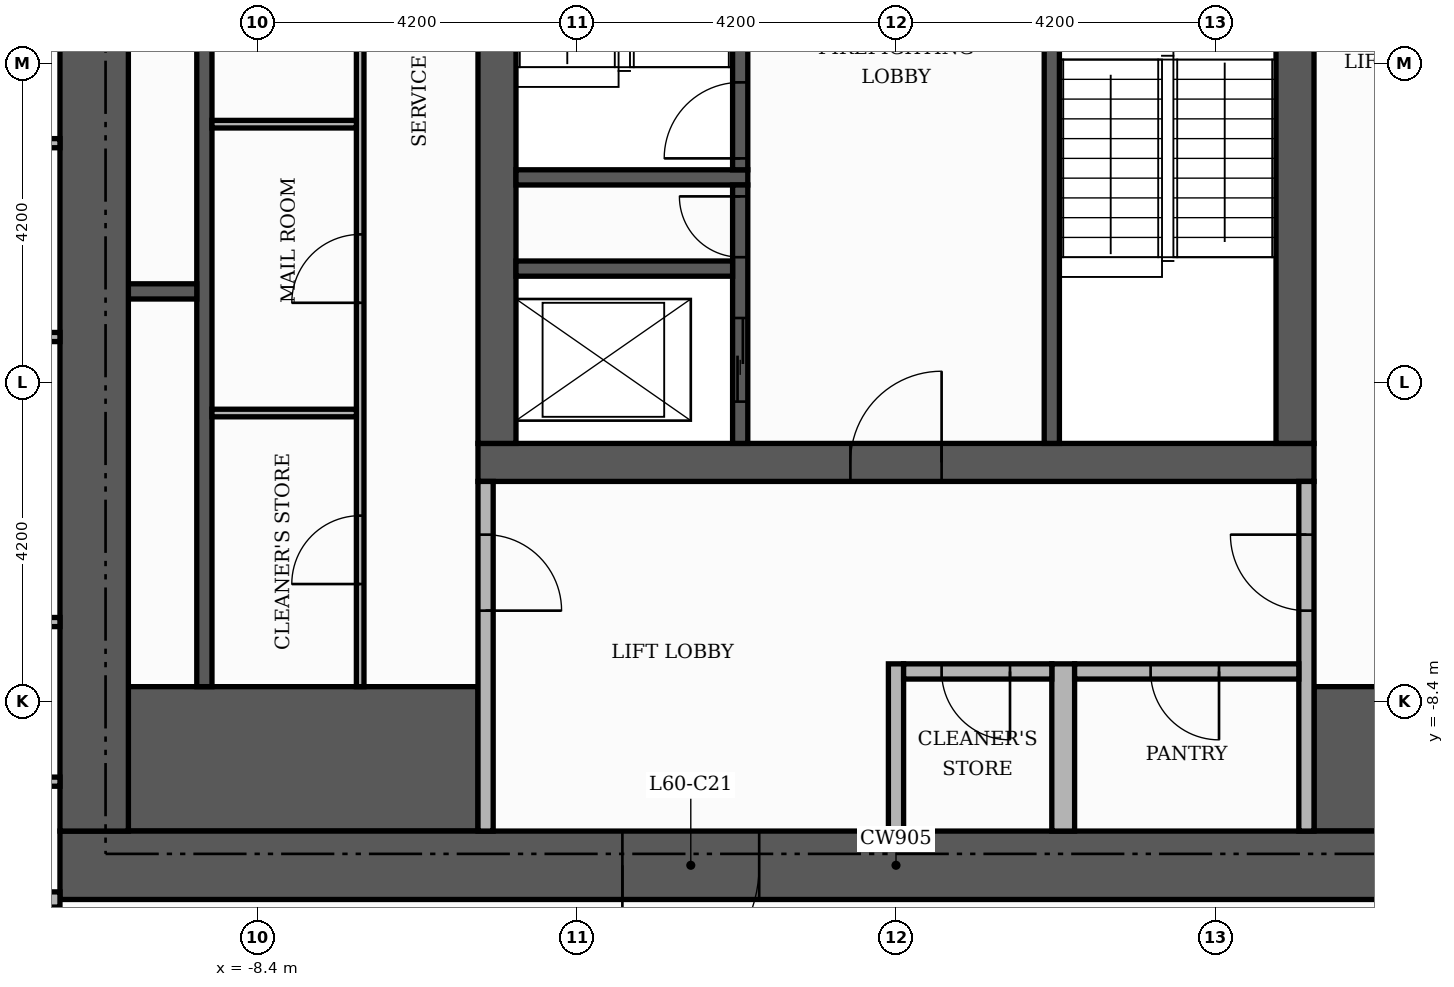
"""IFC4 building model, lengths in metres.
Left out: names, types, materials, properties, quantities, classifications, styles, units other than length and angle.
Written with IfcOpenShell. Run it as: python <this file> out.ifc"""

import sys

from ifc_helpers import new_model, si_unit, direction, frame, frame_2d, origin, place, context, subcontext, project, spatial, rectangle, extrude, element, fill, save


model = new_model("IFC4")
c1 = context("Model", 3, precision=1e-05, world=origin(), true_north=direction((0.0, 1.0)))
c2 = subcontext(c1, "Body", "Model", "MODEL_VIEW")
j1 = project(units=[si_unit("LENGTHUNIT", "METRE"), si_unit("PLANEANGLEUNIT", "RADIAN")], contexts=[c1])
p1 = place(None, origin())
s1 = spatial("IfcSite", under=j1, at=p1, CompositionType="ELEMENT")
p2 = place(p1, origin())
s2 = spatial("IfcBuilding", under=s1, at=p2, CompositionType="ELEMENT")
p3 = place(p2, frame((0.0, 0.0, 252.3)))
s3 = spatial("IfcBuildingStorey", under=s2, at=p3, CompositionType="ELEMENT", Elevation=252.3)
p4 = place(p3, frame((-5.5, -5.25, 0.0), z_axis=(0.0, 0.0, 1.0), x_axis=(1.0, 0.0, 0.0)))
e1 = element("IfcWall", 1, at=p4, inside=s3, PredefinedType="SHEAR", context=c2, shape_type="SweptSolid", body=[
    extrude(rectangle(XDim=11.0, YDim=0.5, at=frame_2d((5.5, 0.0))), origin(), (0.0, 0.0, 1.0), 3.48),
])
p5 = place(p4, frame((4.9, 0.0, 0.0)))
e2 = element("IfcOpeningElement", 2, at=p5, cuts=e1, PredefinedType="OPENING", context=c2, shape_type="SweptSolid", body=[
    extrude(rectangle(XDim=1.2, YDim=2.1, at=frame_2d((0.6, 1.05))), frame((0.0, 0.26, 0.0), z_axis=(0.0, -1.0, 0.0), x_axis=(1.0, 0.0, 0.0)), (0.0, 0.0, 1.0), 0.52),
])
for number, where, z_axis, x_axis in (
    (3, (-5.25, -5.0, 0.0), (0.0, 0.0, 1.0), (0.0, 1.0, 0.0)),
    (4, (5.25, -5.0, 0.0), (0.0, 0.0, 1.0), (0.0, 1.0, 0.0)),
):
    element("IfcWall", number, at=place(p3, frame(where, z_axis=z_axis, x_axis=x_axis)), inside=s3, PredefinedType="SHEAR", context=c2, shape_type="SweptSolid", body=[
        extrude(rectangle(XDim=10.5, YDim=0.5, at=frame_2d((5.25, 0.0))), origin(), (0.0, 0.0, 1.0), 3.48),
    ])
for number, where, z_axis, x_axis in (
    (5, (-10.1, -9.15, 0.0), (0.0, 0.0, 1.0), (1.0, 0.0, 0.0)),
    (6, (5.5, -9.15, 0.0), (0.0, 0.0, 1.0), (1.0, 0.0, 0.0)),
):
    element("IfcWall", number, at=place(p3, frame(where, z_axis=z_axis, x_axis=x_axis)), inside=s3, PredefinedType="SHEAR", context=c2, shape_type="SweptSolid", body=[
        extrude(rectangle(XDim=4.6, YDim=1.9, at=frame_2d((2.3, 0.0))), origin(), (0.0, 0.0, 1.0), 3.48),
    ])
p6 = place(p3, frame((2.05, -5.0, 0.0), z_axis=(0.0, 0.0, 1.0), x_axis=(0.0, 1.0, 0.0)))
e7 = element("IfcWall", 7, at=p6, inside=s3, PredefinedType="SHEAR", context=c2, shape_type="SweptSolid", body=[
    extrude(rectangle(XDim=6.6, YDim=0.2, at=frame_2d((3.3, 0.0))), origin(), (0.0, 0.0, 1.0), 3.48),
])
p7 = place(p6, frame((5.25, 0.0, 0.0)))
e8 = element("IfcOpeningElement", 8, at=p7, cuts=e7, PredefinedType="OPENING", context=c2, shape_type="SweptSolid", body=[
    extrude(rectangle(XDim=1.0, YDim=2.1, at=frame_2d((0.5, 1.05))), frame((0.0, 0.11, 0.0), z_axis=(0.0, -1.0, 0.0), x_axis=(1.0, 0.0, 0.0)), (0.0, 0.0, 1.0), 0.22),
])
p8 = place(p3, frame((-5.0, -1.5, 0.0), z_axis=(0.0, 0.0, 1.0), x_axis=(1.0, 0.0, 0.0)))
e9 = element("IfcWall", 9, at=p8, inside=s3, PredefinedType="SHEAR", context=c2, shape_type="SweptSolid", body=[
    extrude(rectangle(XDim=3.05, YDim=0.2, at=frame_2d((1.525, 0.0))), origin(), (0.0, 0.0, 1.0), 3.48),
])
p9 = place(p3, frame((-2.05, -1.4, 0.0), z_axis=(0.0, 0.0, 1.0), x_axis=(0.0, 1.0, 0.0)))
e10 = element("IfcWall", 10, at=p9, inside=s3, PredefinedType="SHEAR", context=c2, shape_type="SweptSolid", body=[
    extrude(rectangle(XDim=6.4, YDim=0.2, at=frame_2d((3.2, 0.0))), origin(), (0.0, 0.0, 1.0), 3.48),
])
p10 = place(p9, frame((0.15, 0.0, 0.0)))
e11 = element("IfcOpeningElement", 11, at=p10, cuts=e10, PredefinedType="OPENING", context=c2, shape_type="SweptSolid", body=[
    extrude(rectangle(XDim=1.0, YDim=2.1, at=frame_2d((0.5, 1.05))), frame((0.0, 0.11, 0.0), z_axis=(0.0, -1.0, 0.0), x_axis=(1.0, 0.0, 0.0)), (0.0, 0.0, 1.0), 0.22),
])
p11 = place(p3, frame((-9.1, -8.2, 0.0), z_axis=(0.0, 0.0, 1.0), x_axis=(0.0, 1.0, 0.0)))
e12 = element("IfcWall", 12, at=p11, inside=s3, PredefinedType="SHEAR", context=c2, shape_type="SweptSolid", body=[
    extrude(rectangle(XDim=16.4, YDim=0.2, at=frame_2d((8.2, 0.0))), origin(), (0.0, 0.0, 1.0), 3.48),
])
p12 = place(p3, frame((-2.05, -5.0, 0.0), z_axis=(0.0, 0.0, 1.0), x_axis=(0.0, 1.0, 0.0)))
e13 = element("IfcWall", 13, at=p12, inside=s3, PredefinedType="SHEAR", context=c2, shape_type="SweptSolid", body=[
    extrude(rectangle(XDim=3.4, YDim=0.2, at=frame_2d((1.7, 0.0))), origin(), (0.0, 0.0, 1.0), 3.48),
])
p13 = place(p12, frame((0.55, 0.0, 0.0)))
e14 = element("IfcOpeningElement", 14, at=p13, cuts=e13, PredefinedType="OPENING", context=c2, shape_type="SweptSolid", body=[
    extrude(rectangle(XDim=1.1, YDim=2.1, at=frame_2d((0.55, 1.05))), frame((0.0, 0.11, 0.0), z_axis=(0.0, -1.0, 0.0), x_axis=(1.0, 0.0, 0.0)), (0.0, 0.0, 1.0), 0.22),
])
p14 = place(p12, frame((2.45, 0.0, 0.0)))
e15 = element("IfcOpeningElement", 15, at=p14, cuts=e13, PredefinedType="OPENING", context=c2, shape_type="SweptSolid", body=[
    extrude(rectangle(XDim=0.8, YDim=2.1, at=frame_2d((0.4, 1.05))), frame((0.0, 0.11, 0.0), z_axis=(0.0, -1.0, 0.0), x_axis=(1.0, 0.0, 0.0)), (0.0, 0.0, 1.0), 0.22),
])
p15 = place(p3, frame((-10.1, -3.0, 0.0), z_axis=(0.0, 0.0, 1.0), x_axis=(1.0, 0.0, 0.0)))
e16 = element("IfcWall", 16, at=p15, inside=s3, PredefinedType="SHEAR", context=c2, shape_type="SweptSolid", body=[
    extrude(rectangle(XDim=0.9, YDim=0.2, at=frame_2d((0.45, 0.0))), origin(), (0.0, 0.0, 1.0), 3.48),
])
p16 = place(p3, frame((-5.0, -2.7, 0.0), z_axis=(0.0, 0.0, 1.0), x_axis=(1.0, 0.0, 0.0)))
e17 = element("IfcWall", 17, at=p16, inside=s3, PredefinedType="SHEAR", context=c2, shape_type="SweptSolid", body=[
    extrude(rectangle(XDim=2.85, YDim=0.2, at=frame_2d((1.425, 0.0))), origin(), (0.0, 0.0, 1.0), 3.48),
])
p17 = place(p3, frame((-11.0, -10.55, 0.0), z_axis=(0.0, 0.0, 1.0), x_axis=(1.0, 0.0, 0.0)))
e18 = element("IfcWall", 18, at=p17, inside=s3, PredefinedType="SHEAR", context=c2, shape_type="SweptSolid", body=[
    extrude(rectangle(XDim=22.0, YDim=0.9, at=frame_2d((11.0, 0.0))), origin(), (0.0, 0.0, 1.0), 3.48),
])
p18 = place(p17, frame((7.4, 0.0, 0.0)))
e19 = element("IfcOpeningElement", 19, at=p18, cuts=e18, PredefinedType="OPENING", context=c2, shape_type="SweptSolid", body=[
    extrude(rectangle(XDim=1.8, YDim=2.2, at=frame_2d((0.9, 1.1))), frame((0.0, 0.46, 0.0), z_axis=(0.0, -1.0, 0.0), x_axis=(1.0, 0.0, 0.0)), (0.0, 0.0, 1.0), 0.92),
])
p19 = place(p3, frame((-10.55, -10.1, 0.0), z_axis=(0.0, 0.0, 1.0), x_axis=(0.0, 1.0, 0.0)))
e20 = element("IfcWall", 20, at=p19, inside=s3, PredefinedType="SHEAR", context=c2, shape_type="SweptSolid", body=[
    extrude(rectangle(XDim=20.2, YDim=0.9, at=frame_2d((10.1, 0.0))), origin(), (0.0, 0.0, 1.0), 3.48),
])
p20 = place(p3, frame((-5.4, -10.1, 0.0), z_axis=(0.0, 0.0, 1.0), x_axis=(0.0, 1.0, 0.0)))
e21 = element("IfcWall", 21, at=p20, inside=s3, PredefinedType="PARTITIONING", context=c2, shape_type="SweptSolid", body=[
    extrude(rectangle(XDim=4.6, YDim=0.2, at=frame_2d((2.3, 0.0))), origin(), (0.0, 0.0, 1.0), 3.48),
])
p21 = place(p20, frame((2.9, 0.0, 0.0)))
e22 = element("IfcOpeningElement", 22, at=p21, cuts=e21, PredefinedType="OPENING", context=c2, shape_type="SweptSolid", body=[
    extrude(rectangle(XDim=1.0, YDim=2.1, at=frame_2d((0.5, 1.05))), frame((0.0, 0.11, 0.0), z_axis=(0.0, -1.0, 0.0), x_axis=(1.0, 0.0, 0.0)), (0.0, 0.0, 1.0), 0.22),
])
p22 = place(p3, frame((0.0, -10.1, 0.0), z_axis=(0.0, 0.0, 1.0), x_axis=(0.0, 1.0, 0.0)))
e23 = element("IfcWall", 23, at=p22, inside=s3, PredefinedType="PARTITIONING", context=c2, shape_type="SweptSolid", body=[
    extrude(rectangle(XDim=2.2, YDim=0.2, at=frame_2d((1.1, 0.0))), origin(), (0.0, 0.0, 1.0), 3.48),
])
p23 = place(p3, frame((2.2, -10.1, 0.0), z_axis=(0.0, 0.0, 1.0), x_axis=(0.0, 1.0, 0.0)))
e24 = element("IfcWall", 24, at=p23, inside=s3, PredefinedType="PARTITIONING", context=c2, shape_type="SweptSolid", body=[
    extrude(rectangle(XDim=2.2, YDim=0.3, at=frame_2d((1.1, 0.0))), origin(), (0.0, 0.0, 1.0), 3.48),
])
p24 = place(p3, frame((5.4, -10.1, 0.0), z_axis=(0.0, 0.0, 1.0), x_axis=(0.0, 1.0, 0.0)))
e25 = element("IfcWall", 25, at=p24, inside=s3, PredefinedType="PARTITIONING", context=c2, shape_type="SweptSolid", body=[
    extrude(rectangle(XDim=4.6, YDim=0.2, at=frame_2d((2.3, 0.0))), origin(), (0.0, 0.0, 1.0), 3.48),
])
p25 = place(p24, frame((2.9, 0.0, 0.0)))
e26 = element("IfcOpeningElement", 26, at=p25, cuts=e25, PredefinedType="OPENING", context=c2, shape_type="SweptSolid", body=[
    extrude(rectangle(XDim=1.0, YDim=2.1, at=frame_2d((0.5, 1.05))), frame((0.0, 0.11, 0.0), z_axis=(0.0, -1.0, 0.0), x_axis=(1.0, 0.0, 0.0)), (0.0, 0.0, 1.0), 0.22),
])
p26 = place(p3, frame((-7.05, -8.2, 0.0), z_axis=(0.0, 0.0, 1.0), x_axis=(0.0, 1.0, 0.0)))
e27 = element("IfcWall", 27, at=p26, inside=s3, PredefinedType="PARTITIONING", context=c2, shape_type="SweptSolid", body=[
    extrude(rectangle(XDim=16.4, YDim=0.1, at=frame_2d((8.2, 0.0))), origin(), (0.0, 0.0, 1.0), 3.48),
])
p27 = place(p26, frame((1.35, 0.0, 0.0)))
e28 = element("IfcOpeningElement", 28, at=p27, cuts=e27, PredefinedType="OPENING", context=c2, shape_type="SweptSolid", body=[
    extrude(rectangle(XDim=0.9, YDim=2.1, at=frame_2d((0.45, 1.05))), frame((0.0, 0.06, 0.0), z_axis=(0.0, -1.0, 0.0), x_axis=(1.0, 0.0, 0.0)), (0.0, 0.0, 1.0), 0.12),
])
p28 = place(p26, frame((5.05, 0.0, 0.0)))
e29 = element("IfcOpeningElement", 29, at=p28, cuts=e27, PredefinedType="OPENING", context=c2, shape_type="SweptSolid", body=[
    extrude(rectangle(XDim=0.9, YDim=2.1, at=frame_2d((0.45, 1.05))), frame((0.0, 0.06, 0.0), z_axis=(0.0, -1.0, 0.0), x_axis=(1.0, 0.0, 0.0)), (0.0, 0.0, 1.0), 0.12),
])
p29 = place(p26, frame((8.95, 0.0, 0.0)))
e30 = element("IfcOpeningElement", 30, at=p29, cuts=e27, PredefinedType="OPENING", context=c2, shape_type="SweptSolid", body=[
    extrude(rectangle(XDim=0.9, YDim=2.1, at=frame_2d((0.45, 1.05))), frame((0.0, 0.06, 0.0), z_axis=(0.0, -1.0, 0.0), x_axis=(1.0, 0.0, 0.0)), (0.0, 0.0, 1.0), 0.12),
])
p30 = place(p26, frame((13.45, 0.0, 0.0)))
e31 = element("IfcOpeningElement", 31, at=p30, cuts=e27, PredefinedType="OPENING", context=c2, shape_type="SweptSolid", body=[
    extrude(rectangle(XDim=0.9, YDim=2.1, at=frame_2d((0.45, 1.05))), frame((0.0, 0.06, 0.0), z_axis=(0.0, -1.0, 0.0), x_axis=(1.0, 0.0, 0.0)), (0.0, 0.0, 1.0), 0.12),
])
p31 = place(p3, frame((0.1, -8.0, 0.0), z_axis=(0.0, 0.0, 1.0), x_axis=(1.0, 0.0, 0.0)))
e32 = element("IfcWall", 32, at=p31, inside=s3, PredefinedType="PARTITIONING", context=c2, shape_type="SweptSolid", body=[
    extrude(rectangle(XDim=1.95, YDim=0.2, at=frame_2d((0.975, 0.0))), origin(), (0.0, 0.0, 1.0), 3.48),
])
p32 = place(p31, frame((0.5, 0.0, 0.0)))
e33 = element("IfcOpeningElement", 33, at=p32, cuts=e32, PredefinedType="OPENING", context=c2, shape_type="SweptSolid", body=[
    extrude(rectangle(XDim=0.9, YDim=2.1, at=frame_2d((0.45, 1.05))), frame((0.0, 0.11, 0.0), z_axis=(0.0, -1.0, 0.0), x_axis=(1.0, 0.0, 0.0)), (0.0, 0.0, 1.0), 0.22),
])
p33 = place(p3, frame((2.35, -8.0, 0.0), z_axis=(0.0, 0.0, 1.0), x_axis=(1.0, 0.0, 0.0)))
e34 = element("IfcWall", 34, at=p33, inside=s3, PredefinedType="PARTITIONING", context=c2, shape_type="SweptSolid", body=[
    extrude(rectangle(XDim=2.95, YDim=0.2, at=frame_2d((1.475, 0.0))), origin(), (0.0, 0.0, 1.0), 3.48),
])
p34 = place(p33, frame((1.0, 0.0, 0.0)))
e35 = element("IfcOpeningElement", 35, at=p34, cuts=e34, PredefinedType="OPENING", context=c2, shape_type="SweptSolid", body=[
    extrude(rectangle(XDim=0.9, YDim=2.1, at=frame_2d((0.45, 1.05))), frame((0.0, 0.11, 0.0), z_axis=(0.0, -1.0, 0.0), x_axis=(1.0, 0.0, 0.0)), (0.0, 0.0, 1.0), 0.22),
])
for number, where, z_axis, x_axis in (
    (36, (-9.0, -4.6, 0.0), (0.0, 0.0, 1.0), (1.0, 0.0, 0.0)),
    (37, (-9.0, -0.8, 0.0), (0.0, 0.0, 1.0), (1.0, 0.0, 0.0)),
):
    element("IfcWall", number, at=place(p3, frame(where, z_axis=z_axis, x_axis=x_axis)), inside=s3, PredefinedType="PARTITIONING", context=c2, shape_type="SweptSolid", body=[
        extrude(rectangle(XDim=1.9, YDim=0.1, at=frame_2d((0.95, 0.0))), origin(), (0.0, 0.0, 1.0), 3.48),
    ])
p35 = place(p3, frame((-13.65, -11.0, 0.0), z_axis=(0.0, 0.0, 1.0), x_axis=(1.0, 0.0, 0.0)))
e38 = element("IfcWall", 38, at=p35, inside=s3, PredefinedType="PARTITIONING", context=c2, shape_type="SweptSolid", body=[
    extrude(rectangle(XDim=2.65, YDim=0.2, at=frame_2d((1.325, 0.0))), origin(), (0.0, 0.0, 1.0), 3.48),
])
for number, where, z_axis, x_axis in (
    (39, (-18.62, -9.45, 0.0), (0.0, 0.0, 1.0), (1.0, 0.0, 0.0)),
    (40, (-18.62, -7.35, 0.0), (0.0, 0.0, 1.0), (1.0, 0.0, 0.0)),
    (41, (-18.62, -3.6, 0.0), (0.0, 0.0, 1.0), (1.0, 0.0, 0.0)),
    (42, (-18.62, -1.05, 0.0), (0.0, 0.0, 1.0), (1.0, 0.0, 0.0)),
):
    element("IfcWall", number, at=place(p3, frame(where, z_axis=z_axis, x_axis=x_axis)), inside=s3, PredefinedType="PARTITIONING", context=c2, shape_type="SweptSolid", body=[
        extrude(rectangle(XDim=7.62, YDim=0.12, at=frame_2d((3.81, 0.0))), origin(), (0.0, 0.0, 1.0), 3.48),
    ])
p36 = place(p13, origin())
e43 = element("IfcDoor", 43, at=p36, inside=s3, OperationType="SLIDING_TO_LEFT", PredefinedType="DOOR", context=c2, shape_type="SweptSolid", body=[
    extrude(rectangle(XDim=1.1, YDim=2.1, at=frame_2d((0.55, 1.05))), frame((0.0, 0.025, 0.0), z_axis=(0.0, -1.0, 0.0), x_axis=(1.0, 0.0, 0.0)), (0.0, 0.0, 1.0), 0.05),
])
fill(e14, e43)
p37 = place(p10, origin())
e44 = element("IfcDoor", 44, at=p37, inside=s3, OperationType="SINGLE_SWING_LEFT", PredefinedType="DOOR", context=c2, shape_type="SweptSolid", body=[
    extrude(rectangle(XDim=1.0, YDim=2.1, at=frame_2d((0.5, 1.05))), frame((0.0, 0.025, 0.0), z_axis=(0.0, -1.0, 0.0), x_axis=(1.0, 0.0, 0.0)), (0.0, 0.0, 1.0), 0.05),
])
fill(e11, e44)
p38 = place(p14, origin())
e45 = element("IfcDoor", 45, at=p38, inside=s3, OperationType="SINGLE_SWING_RIGHT", PredefinedType="DOOR", context=c2, shape_type="SweptSolid", body=[
    extrude(rectangle(XDim=0.8, YDim=2.1, at=frame_2d((0.4, 1.05))), frame((0.0, 0.025, 0.0), z_axis=(0.0, -1.0, 0.0), x_axis=(1.0, 0.0, 0.0)), (0.0, 0.0, 1.0), 0.05),
])
fill(e15, e45)
p39 = place(p5, origin())
e46 = element("IfcDoor", 46, at=p39, inside=s3, OperationType="SINGLE_SWING_RIGHT", PredefinedType="DOOR", context=c2, shape_type="SweptSolid", body=[
    extrude(rectangle(XDim=1.2, YDim=2.1, at=frame_2d((0.6, 1.05))), frame((0.0, 0.025, 0.0), z_axis=(0.0, -1.0, 0.0), x_axis=(1.0, 0.0, 0.0)), (0.0, 0.0, 1.0), 0.05),
])
fill(e2, e46)
p40 = place(p21, frame((1.0, 0.0, 0.0), z_axis=(0.0, 0.0, 1.0), x_axis=(-1.0, 0.0, 0.0)))
e47 = element("IfcDoor", 47, at=p40, inside=s3, OperationType="SINGLE_SWING_LEFT", PredefinedType="DOOR", context=c2, shape_type="SweptSolid", body=[
    extrude(rectangle(XDim=1.0, YDim=2.1, at=frame_2d((0.5, 1.05))), frame((0.0, 0.025, 0.0), z_axis=(0.0, -1.0, 0.0), x_axis=(1.0, 0.0, 0.0)), (0.0, 0.0, 1.0), 0.05),
])
fill(e22, e47)
p41 = place(p25, origin())
e48 = element("IfcDoor", 48, at=p41, inside=s3, OperationType="SINGLE_SWING_RIGHT", PredefinedType="DOOR", context=c2, shape_type="SweptSolid", body=[
    extrude(rectangle(XDim=1.0, YDim=2.1, at=frame_2d((0.5, 1.05))), frame((0.0, 0.025, 0.0), z_axis=(0.0, -1.0, 0.0), x_axis=(1.0, 0.0, 0.0)), (0.0, 0.0, 1.0), 0.05),
])
fill(e26, e48)
p42 = place(p18, frame((1.8, 0.0, 0.0), z_axis=(0.0, 0.0, 1.0), x_axis=(-1.0, 0.0, 0.0)))
e49 = element("IfcDoor", 49, at=p42, inside=s3, OperationType="DOUBLE_DOOR_SINGLE_SWING", PredefinedType="DOOR", context=c2, shape_type="SweptSolid", body=[
    extrude(rectangle(XDim=1.8, YDim=2.2, at=frame_2d((0.9, 1.1))), frame((0.0, 0.025, 0.0), z_axis=(0.0, -1.0, 0.0), x_axis=(1.0, 0.0, 0.0)), (0.0, 0.0, 1.0), 0.05),
])
fill(e19, e49)
p43 = place(p32, frame((0.9, 0.0, 0.0), z_axis=(0.0, 0.0, 1.0), x_axis=(-1.0, 0.0, 0.0)))
e50 = element("IfcDoor", 50, at=p43, inside=s3, OperationType="SINGLE_SWING_RIGHT", PredefinedType="DOOR", context=c2, shape_type="SweptSolid", body=[
    extrude(rectangle(XDim=0.9, YDim=2.1, at=frame_2d((0.45, 1.05))), frame((0.0, 0.025, 0.0), z_axis=(0.0, -1.0, 0.0), x_axis=(1.0, 0.0, 0.0)), (0.0, 0.0, 1.0), 0.05),
])
fill(e33, e50)
p44 = place(p34, frame((0.9, 0.0, 0.0), z_axis=(0.0, 0.0, 1.0), x_axis=(-1.0, 0.0, 0.0)))
e51 = element("IfcDoor", 51, at=p44, inside=s3, OperationType="SINGLE_SWING_RIGHT", PredefinedType="DOOR", context=c2, shape_type="SweptSolid", body=[
    extrude(rectangle(XDim=0.9, YDim=2.1, at=frame_2d((0.45, 1.05))), frame((0.0, 0.025, 0.0), z_axis=(0.0, -1.0, 0.0), x_axis=(1.0, 0.0, 0.0)), (0.0, 0.0, 1.0), 0.05),
])
fill(e35, e51)
p45 = place(p27, origin())
e52 = element("IfcDoor", 52, at=p45, inside=s3, OperationType="SINGLE_SWING_LEFT", PredefinedType="DOOR", context=c2, shape_type="SweptSolid", body=[
    extrude(rectangle(XDim=0.9, YDim=2.1, at=frame_2d((0.45, 1.05))), frame((0.0, 0.025, 0.0), z_axis=(0.0, -1.0, 0.0), x_axis=(1.0, 0.0, 0.0)), (0.0, 0.0, 1.0), 0.05),
])
fill(e28, e52)
p46 = place(p28, origin())
e53 = element("IfcDoor", 53, at=p46, inside=s3, OperationType="SINGLE_SWING_LEFT", PredefinedType="DOOR", context=c2, shape_type="SweptSolid", body=[
    extrude(rectangle(XDim=0.9, YDim=2.1, at=frame_2d((0.45, 1.05))), frame((0.0, 0.025, 0.0), z_axis=(0.0, -1.0, 0.0), x_axis=(1.0, 0.0, 0.0)), (0.0, 0.0, 1.0), 0.05),
])
fill(e29, e53)
save(model, sys.argv[1])
